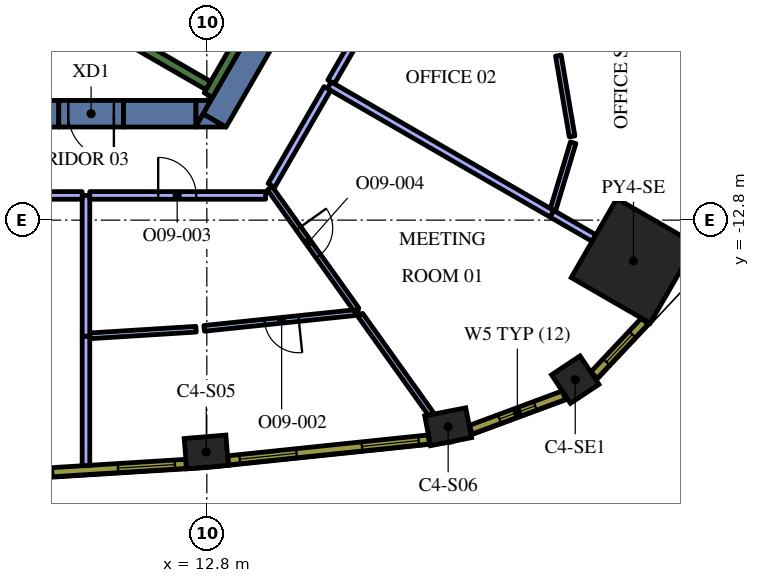
"""IFC4 building model, lengths in metres.
Left out: names, types, materials, properties, quantities, classifications, styles, units other than length and angle.
Written with IfcOpenShell. Run it as: python <this file> out.ifc"""

import sys

from ifc_helpers import new_model, si_unit, direction, frame, frame_2d, origin, origin_2d, place, context, subcontext, project, spatial, polyline, rectangle, outline, extrude, element, fill, save


model = new_model("IFC4")
c1 = context("Model", 3, precision=1e-05, world=origin(), true_north=direction((0.0, 1.0)))
c2 = subcontext(c1, "Body", "Model", "MODEL_VIEW")
j1 = project(units=[si_unit("LENGTHUNIT", "METRE"), si_unit("PLANEANGLEUNIT", "RADIAN")], contexts=[c1])
p1 = place(None, origin())
s1 = spatial("IfcSite", under=j1, at=p1, CompositionType="ELEMENT")
p2 = place(p1, origin())
s2 = spatial("IfcBuilding", under=s1, at=p2, CompositionType="ELEMENT")
p3 = place(p2, frame((0.0, 0.0, 243.6)))
s3 = spatial("IfcBuildingStorey", under=s2, at=p3, CompositionType="ELEMENT", Elevation=243.6)
p4 = place(p3, frame((24.027, -13.872, 0.0), z_axis=(0.0, 0.0, 1.0), x_axis=(0.866025403784, -0.5, 0.0)))
e1 = element("IfcColumn", 1, at=p4, inside=s3, PredefinedType="COLUMN", context=c2, shape_type="SweptSolid", body=[
    extrude(rectangle(XDim=2.4, YDim=2.4, at=origin_2d()), origin(), (0.0, 0.0, 1.0), 4.2),
])
for number, where, z_axis, x_axis in (
    (2, (12.785, -18.9, 0.0), (0.0, 0.0, 1.0), (0.997, 0.083, 0.0)),
    (3, (19.15, -18.237, 0.0), (0.0, 0.0, 1.0), (0.981, 0.192, 0.0)),
):
    element("IfcColumn", number, at=place(p3, frame(where, z_axis=z_axis, x_axis=x_axis)), inside=s3, PredefinedType="COLUMN", context=c2, shape_type="SweptSolid", body=[
        extrude(rectangle(XDim=1.1, YDim=0.8, at=origin_2d()), origin(), (0.0, 0.0, 1.0), 4.2),
    ])
p5 = place(p3, frame((22.494, -16.997, 0.0), z_axis=(0.0, 0.0, 1.0), x_axis=(0.833238868178, 0.552913183563, 0.0)))
e4 = element("IfcColumn", 4, at=p5, inside=s3, PredefinedType="COLUMN", context=c2, shape_type="SweptSolid", body=[
    extrude(rectangle(XDim=0.9, YDim=0.9, at=origin_2d()), origin(), (0.0, 0.0, 1.0), 4.2),
])
p6 = place(p3, frame((13.003, -10.179, 0.0), z_axis=(0.0, 0.0, 1.0), x_axis=(0.499972675833, 0.866041178825, 0.0)))
e5 = element("IfcWall", 5, at=p6, inside=s3, PredefinedType="SOLIDWALL", context=c2, shape_type="SweptSolid", body=[
    extrude(rectangle(XDim=3.829, YDim=0.7, at=frame_2d((1.915, 0.0))), origin(), (0.0, 0.0, 1.0), 4.2),
])
p7 = place(p3, origin())
e6 = element("IfcWall", 6, at=p7, inside=s3, PredefinedType="SOLIDWALL", context=c2, shape_type="SweptSolid", body=[
    extrude(outline(polyline([(12.5, -10.35), (12.698, -10.005), (13.296, -10.35), (12.5, -10.35)])), origin(), (0.0, 0.0, 1.0), 4.2),
])
p8 = place(p3, frame((10.604, -10.0, 0.0), z_axis=(0.0, 0.0, 1.0), x_axis=(1.0, 0.0, 0.0)))
e7 = element("IfcWall", 7, at=p8, inside=s3, PredefinedType="SOLIDWALL", context=c2, shape_type="SweptSolid", body=[
    extrude(rectangle(XDim=1.909, YDim=0.7, at=frame_2d((0.955, 0.0))), origin(), (0.0, 0.0, 1.0), 4.2),
])
e8 = element("IfcWall", 8, at=p7, inside=s3, PredefinedType="SOLIDWALL", context=c2, shape_type="SweptSolid", body=[
    extrude(outline(polyline([(12.904, -9.65), (12.516, -10.322), (12.516, -9.65), (12.904, -9.65)])), origin(), (0.0, 0.0, 1.0), 4.2),
])
p9 = place(p3, frame((8.904, -10.0, 0.0), z_axis=(0.0, 0.0, 1.0), x_axis=(-1.0, 0.0, 0.0)))
e9 = element("IfcWall", 9, at=p9, inside=s3, PredefinedType="SOLIDWALL", context=c2, shape_type="SweptSolid", body=[
    extrude(rectangle(XDim=22.226, YDim=0.7, at=frame_2d((11.113, 0.0))), origin(), (0.0, 0.0, 1.0), 4.2),
])
p10 = place(p3, frame((12.84, -9.511, 0.0), z_axis=(0.0, 0.0, 1.0), x_axis=(0.500048121057, 0.865997619297, 0.0)))
e10 = element("IfcWall", 10, at=p10, inside=s3, PredefinedType="SOLIDWALL", context=c2, shape_type="SweptSolid", body=[
    extrude(rectangle(XDim=3.634, YDim=0.25, at=frame_2d((1.817, 0.0))), origin(), (0.0, 0.0, 1.0), 4.2),
])
p11 = place(p3, frame((12.84, -9.261, 0.0), z_axis=(0.0, 0.0, 1.0), x_axis=(-0.866013990052, 0.500019768644, 0.0)))
e11 = element("IfcWall", 11, at=p11, inside=s3, PredefinedType="SOLIDWALL", context=c2, shape_type="SweptSolid", body=[
    extrude(rectangle(XDim=6.8, YDim=0.25, at=frame_2d((3.4, 0.0))), origin(), (0.0, 0.0, 1.0), 4.2),
])
p12 = place(p3, frame((10.604, -10.0, 0.0), z_axis=(0.0, 0.0, 1.0), x_axis=(-1.0, 0.0, 0.0)))
e12 = element("IfcWall", 12, at=p12, inside=s3, PredefinedType="SOLIDWALL", context=c2, shape_type="SweptSolid", body=[
    extrude(rectangle(XDim=1.7, YDim=0.7, at=frame_2d((0.85, 0.0))), origin(), (0.0, 0.0, 1.0), 4.2),
])
p13 = place(p12, frame((0.25, 0.0, 0.0)))
e13 = element("IfcOpeningElement", 13, at=p13, cuts=e12, PredefinedType="OPENING", context=c2, shape_type="SweptSolid", body=[
    extrude(rectangle(XDim=1.2, YDim=2.1, at=frame_2d((0.6, 1.05))), frame((0.0, 0.36, 0.0), z_axis=(0.0, -1.0, 0.0), x_axis=(1.0, 0.0, 0.0)), (0.0, 0.0, 1.0), 0.72),
])
p14 = place(p3, frame((9.62, -15.847, 0.0), z_axis=(0.0, 0.0, 1.0), x_axis=(0.0, -1.0, 0.0)))
e14 = element("IfcWall", 14, at=p14, inside=s3, PredefinedType="PARTITIONING", context=c2, shape_type="SweptSolid", body=[
    extrude(rectangle(XDim=3.411, YDim=0.2, at=frame_2d((1.705, 0.0))), origin(), (0.0, 0.0, 1.0), 3.45),
])
p15 = place(p3, frame((9.62, -12.15, 0.0), z_axis=(0.0, 0.0, 1.0), x_axis=(0.0, -1.0, 0.0)))
e15 = element("IfcWall", 15, at=p15, inside=s3, PredefinedType="PARTITIONING", context=c2, shape_type="SweptSolid", body=[
    extrude(rectangle(XDim=3.705, YDim=0.2, at=frame_2d((1.853, 0.0))), origin(), (0.0, 0.0, 1.0), 3.45),
])
p16 = place(p3, frame((7.03, -12.15, 0.0), z_axis=(0.0, 0.0, 1.0), x_axis=(1.0, 0.0, 0.0)))
e16 = element("IfcWall", 16, at=p16, inside=s3, PredefinedType="PARTITIONING", context=c2, shape_type="SweptSolid", body=[
    extrude(rectangle(XDim=2.49, YDim=0.2, at=frame_2d((1.245, 0.0))), origin(), (0.0, 0.0, 1.0), 3.45),
])
p17 = place(p3, frame((9.72, -15.844, 0.0), z_axis=(0.0, 0.0, 1.0), x_axis=(0.998063411199, 0.062204720286, 0.0)))
e17 = element("IfcWall", 17, at=p17, inside=s3, PredefinedType="PARTITIONING", context=c2, shape_type="SweptSolid", body=[
    extrude(rectangle(XDim=2.802, YDim=0.15, at=frame_2d((1.401, 0.0))), origin(), (0.0, 0.0, 1.0), 3.45),
])
p18 = place(p3, frame((16.788, -15.225, 0.0), z_axis=(0.0, 0.0, 1.0), x_axis=(-0.994622518406, -0.103566625322, 0.0)))
e18 = element("IfcWall", 18, at=p18, inside=s3, PredefinedType="PARTITIONING", context=c2, shape_type="SweptSolid", body=[
    extrude(rectangle(XDim=4.081, YDim=0.15, at=frame_2d((2.04, 0.0))), origin(), (0.0, 0.0, 1.0), 3.45),
])
p19 = place(p18, frame((1.581, 0.0, 0.0)))
e19 = element("IfcOpeningElement", 19, at=p19, cuts=e18, PredefinedType="OPENING", context=c2, shape_type="SweptSolid", body=[
    extrude(rectangle(XDim=0.9, YDim=2.1, at=frame_2d((0.45, 1.05))), frame((0.0, 0.085, 0.0), z_axis=(0.0, -1.0, 0.0), x_axis=(1.0, 0.0, 0.0)), (0.0, 0.0, 1.0), 0.17),
])
p20 = place(p3, frame((16.838, -15.295, 0.0), z_axis=(0.0, 0.0, 1.0), x_axis=(0.581015803238, -0.813892275666, 0.0)))
e20 = element("IfcWall", 20, at=p20, inside=s3, PredefinedType="PARTITIONING", context=c2, shape_type="SweptSolid", body=[
    extrude(rectangle(XDim=3.219, YDim=0.15, at=frame_2d((1.61, 0.0))), origin(), (0.0, 0.0, 1.0), 3.45),
])
p21 = place(p3, frame((14.457, -11.96, 0.0), z_axis=(0.0, 0.0, 1.0), x_axis=(0.581049944662, -0.81386790194, 0.0)))
e21 = element("IfcWall", 21, at=p21, inside=s3, PredefinedType="PARTITIONING", context=c2, shape_type="SweptSolid", body=[
    extrude(rectangle(XDim=3.926, YDim=0.15, at=frame_2d((1.963, 0.0))), origin(), (0.0, 0.0, 1.0), 3.45),
])
p22 = place(p21, frame((1.3, 0.0, 0.0)))
e22 = element("IfcOpeningElement", 22, at=p22, cuts=e21, PredefinedType="OPENING", context=c2, shape_type="SweptSolid", body=[
    extrude(rectangle(XDim=0.9, YDim=2.1, at=frame_2d((0.45, 1.05))), frame((0.0, 0.085, 0.0), z_axis=(0.0, -1.0, 0.0), x_axis=(1.0, 0.0, 0.0)), (0.0, 0.0, 1.0), 0.17),
])
p23 = place(p3, frame((9.72, -12.15, 0.0), z_axis=(0.0, 0.0, 1.0), x_axis=(1.0, 0.0, 0.0)))
e23 = element("IfcWall", 23, at=p23, inside=s3, PredefinedType="PARTITIONING", context=c2, shape_type="SweptSolid", body=[
    extrude(rectangle(XDim=4.627, YDim=0.2, at=frame_2d((2.314, 0.0))), origin(), (0.0, 0.0, 1.0), 3.45),
])
p24 = place(p23, frame((1.8, 0.0, 0.0)))
e24 = element("IfcOpeningElement", 24, at=p24, cuts=e23, PredefinedType="OPENING", context=c2, shape_type="SweptSolid", body=[
    extrude(rectangle(XDim=1.0, YDim=2.1, at=frame_2d((0.5, 1.05))), frame((0.0, 0.11, 0.0), z_axis=(0.0, -1.0, 0.0), x_axis=(1.0, 0.0, 0.0)), (0.0, 0.0, 1.0), 0.22),
])
p25 = place(p3, frame((21.873, -12.628, 0.0), z_axis=(0.0, 0.0, 1.0), x_axis=(0.866052988967, -0.499952218018, 0.0)))
e25 = element("IfcWall", 25, at=p25, inside=s3, PredefinedType="PARTITIONING", context=c2, shape_type="SweptSolid", body=[
    extrude(rectangle(XDim=1.288, YDim=0.2, at=frame_2d((0.644, 0.0))), origin(), (0.0, 0.0, 1.0), 3.45),
])
p26 = place(p3, frame((16.021, -9.25, 0.0), z_axis=(0.0, 0.0, 1.0), x_axis=(0.86602692059, -0.499997372806, 0.0)))
e26 = element("IfcWall", 26, at=p26, inside=s3, PredefinedType="PARTITIONING", context=c2, shape_type="SweptSolid", body=[
    extrude(rectangle(XDim=6.765, YDim=0.2, at=frame_2d((3.382, 0.0))), origin(), (0.0, 0.0, 1.0), 3.45),
])
p27 = place(p3, frame((14.498, -11.888, 0.0), z_axis=(0.0, 0.0, 1.0), x_axis=(0.500006981563, 0.86602137294, 0.0)))
e27 = element("IfcWall", 27, at=p27, inside=s3, PredefinedType="PARTITIONING", context=c2, shape_type="SweptSolid", body=[
    extrude(rectangle(XDim=2.946, YDim=0.2, at=frame_2d((1.473, 0.0))), origin(), (0.0, 0.0, 1.0), 3.45),
])
p28 = place(p3, frame((21.906, -12.532, 0.0), z_axis=(0.0, 0.0, 1.0), x_axis=(0.288789848591, 0.957392512688, 0.0)))
e28 = element("IfcWall", 28, at=p28, inside=s3, PredefinedType="PARTITIONING", context=c2, shape_type="SweptSolid", body=[
    extrude(rectangle(XDim=1.848, YDim=0.15, at=frame_2d((0.924, 0.0))), origin(), (0.0, 0.0, 1.0), 3.45),
])
p29 = place(p3, frame((22.412, -10.597, 0.0), z_axis=(0.0, 0.0, 1.0), x_axis=(-0.167612004459, 0.985853039738, 0.0)))
e29 = element("IfcWall", 29, at=p29, inside=s3, PredefinedType="PARTITIONING", context=c2, shape_type="SweptSolid", body=[
    extrude(rectangle(XDim=2.156, YDim=0.15, at=frame_2d((1.078, 0.0))), origin(), (0.0, 0.0, 1.0), 3.45),
])
p30 = place(p3, frame((16.072, -9.163, 0.0), z_axis=(0.0, 0.0, 1.0), x_axis=(0.500010870188, 0.866019127788, 0.0)))
e30 = element("IfcWall", 30, at=p30, inside=s3, PredefinedType="PARTITIONING", context=c2, shape_type="SweptSolid", body=[
    extrude(rectangle(XDim=3.249, YDim=0.2, at=frame_2d((1.624, 0.0))), origin(), (0.0, 0.0, 1.0), 3.45),
])
p31 = place(p3, frame((6.965, -19.543, 0.0), z_axis=(0.0, 0.0, 1.0), x_axis=(0.9980633213, 0.062206162685, 0.0)))
e31 = element("IfcWall", 31, at=p31, inside=s3, PredefinedType="SOLIDWALL", context=c2, shape_type="SweptSolid", body=[
    extrude(rectangle(XDim=5.298, YDim=0.24, at=frame_2d((2.649, 0.0))), origin(), (0.0, 0.0, 1.0), 3.95),
])
p32 = place(p31, frame((0.295, 0.0, 0.9)))
e32 = element("IfcOpeningElement", 32, at=p32, cuts=e31, PredefinedType="OPENING", context=c2, shape_type="SweptSolid", body=[
    extrude(rectangle(XDim=1.5, YDim=2.55, at=frame_2d((0.75, 1.275))), frame((0.0, 0.13, 0.0), z_axis=(0.0, -1.0, 0.0), x_axis=(1.0, 0.0, 0.0)), (0.0, 0.0, 1.0), 0.26),
])
p33 = place(p31, frame((3.504, 0.0, 0.9)))
e33 = element("IfcOpeningElement", 33, at=p33, cuts=e31, PredefinedType="OPENING", context=c2, shape_type="SweptSolid", body=[
    extrude(rectangle(XDim=1.5, YDim=2.55, at=frame_2d((0.75, 1.275))), frame((0.0, 0.13, 0.0), z_axis=(0.0, -1.0, 0.0), x_axis=(1.0, 0.0, 0.0)), (0.0, 0.0, 1.0), 0.26),
])
p34 = place(p3, frame((13.362, -19.121, 0.0), z_axis=(0.0, 0.0, 1.0), x_axis=(0.994621961215, 0.103571976272, 0.0)))
e34 = element("IfcWall", 34, at=p34, inside=s3, PredefinedType="SOLIDWALL", context=c2, shape_type="SweptSolid", body=[
    extrude(rectangle(XDim=5.311, YDim=0.24, at=frame_2d((2.655, 0.0))), origin(), (0.0, 0.0, 1.0), 3.95),
])
p35 = place(p34, frame((0.306, 0.0, 0.9)))
e35 = element("IfcOpeningElement", 35, at=p35, cuts=e34, PredefinedType="OPENING", context=c2, shape_type="SweptSolid", body=[
    extrude(rectangle(XDim=1.5, YDim=2.55, at=frame_2d((0.75, 1.275))), frame((0.0, 0.13, 0.0), z_axis=(0.0, -1.0, 0.0), x_axis=(1.0, 0.0, 0.0)), (0.0, 0.0, 1.0), 0.26),
])
p36 = place(p34, frame((3.539, 0.0, 0.9)))
e36 = element("IfcOpeningElement", 36, at=p36, cuts=e34, PredefinedType="OPENING", context=c2, shape_type="SweptSolid", body=[
    extrude(rectangle(XDim=1.5, YDim=2.55, at=frame_2d((0.75, 1.275))), frame((0.0, 0.13, 0.0), z_axis=(0.0, -1.0, 0.0), x_axis=(1.0, 0.0, 0.0)), (0.0, 0.0, 1.0), 0.26),
])
p37 = place(p3, frame((19.748, -18.314, 0.0), z_axis=(0.0, 0.0, 1.0), x_axis=(0.937569171184, 0.347798863203, 0.0)))
e37 = element("IfcWall", 37, at=p37, inside=s3, PredefinedType="SOLIDWALL", context=c2, shape_type="SweptSolid", body=[
    extrude(rectangle(XDim=2.609, YDim=0.24, at=frame_2d((1.305, 0.0))), origin(), (0.0, 0.0, 1.0), 3.95),
])
p38 = place(p37, frame((0.805, 0.0, 0.9)))
e38 = element("IfcOpeningElement", 38, at=p38, cuts=e37, PredefinedType="OPENING", context=c2, shape_type="SweptSolid", body=[
    extrude(rectangle(XDim=1.0, YDim=2.55, at=frame_2d((0.5, 1.275))), frame((0.0, 0.13, 0.0), z_axis=(0.0, -1.0, 0.0), x_axis=(1.0, 0.0, 0.0)), (0.0, 0.0, 1.0), 0.26),
])
p39 = place(p3, frame((22.989, -16.879, 0.0), z_axis=(0.0, 0.0, 1.0), x_axis=(0.684770274166, 0.728758994194, 0.0)))
e39 = element("IfcWall", 39, at=p39, inside=s3, PredefinedType="SOLIDWALL", context=c2, shape_type="SweptSolid", body=[
    extrude(rectangle(XDim=1.948, YDim=0.24, at=frame_2d((0.974, 0.0))), origin(), (0.0, 0.0, 1.0), 3.95),
])
p40 = place(p39, frame((0.474, 0.0, 0.9)))
e40 = element("IfcOpeningElement", 40, at=p40, cuts=e39, PredefinedType="OPENING", context=c2, shape_type="SweptSolid", body=[
    extrude(rectangle(XDim=1.0, YDim=2.55, at=frame_2d((0.5, 1.275))), frame((0.0, 0.13, 0.0), z_axis=(0.0, -1.0, 0.0), x_axis=(1.0, 0.0, 0.0)), (0.0, 0.0, 1.0), 0.26),
])
p41 = place(p13, origin())
e41 = element("IfcDoor", 41, at=p41, inside=s3, OperationType="SINGLE_SWING_LEFT", PredefinedType="DOOR", context=c2, shape_type="SweptSolid", body=[
    extrude(rectangle(XDim=1.2, YDim=2.1, at=frame_2d((0.6, 1.05))), frame((0.0, 0.025, 0.0), z_axis=(0.0, -1.0, 0.0), x_axis=(1.0, 0.0, 0.0)), (0.0, 0.0, 1.0), 0.05),
])
fill(e13, e41)
p42 = place(p19, origin())
e42 = element("IfcDoor", 42, at=p42, inside=s3, OperationType="SINGLE_SWING_LEFT", PredefinedType="DOOR", context=c2, shape_type="SweptSolid", body=[
    extrude(rectangle(XDim=0.9, YDim=2.1, at=frame_2d((0.45, 1.05))), frame((0.0, 0.025, 0.0), z_axis=(0.0, -1.0, 0.0), x_axis=(1.0, 0.0, 0.0)), (0.0, 0.0, 1.0), 0.05),
])
fill(e19, e42)
p43 = place(p24, origin())
e43 = element("IfcDoor", 43, at=p43, inside=s3, OperationType="SINGLE_SWING_LEFT", PredefinedType="DOOR", context=c2, shape_type="SweptSolid", body=[
    extrude(rectangle(XDim=1.0, YDim=2.1, at=frame_2d((0.5, 1.05))), frame((0.0, 0.025, 0.0), z_axis=(0.0, -1.0, 0.0), x_axis=(1.0, 0.0, 0.0)), (0.0, 0.0, 1.0), 0.05),
])
fill(e24, e43)
p44 = place(p22, origin())
e44 = element("IfcDoor", 44, at=p44, inside=s3, OperationType="SINGLE_SWING_LEFT", PredefinedType="DOOR", context=c2, shape_type="SweptSolid", body=[
    extrude(rectangle(XDim=0.9, YDim=2.1, at=frame_2d((0.45, 1.05))), frame((0.0, 0.025, 0.0), z_axis=(0.0, -1.0, 0.0), x_axis=(1.0, 0.0, 0.0)), (0.0, 0.0, 1.0), 0.05),
])
fill(e22, e44)
p45 = place(p32, origin())
e45 = element("IfcWindow", 45, at=p45, inside=s3, PartitioningType="SINGLE_PANEL", PredefinedType="WINDOW", context=c2, shape_type="SweptSolid", body=[
    extrude(rectangle(XDim=1.5, YDim=2.55, at=frame_2d((0.75, 1.275))), frame((0.0, 0.04, 0.0), z_axis=(0.0, -1.0, 0.0), x_axis=(1.0, 0.0, 0.0)), (0.0, 0.0, 1.0), 0.06),
])
fill(e32, e45)
p46 = place(p33, origin())
e46 = element("IfcWindow", 46, at=p46, inside=s3, PartitioningType="SINGLE_PANEL", PredefinedType="WINDOW", context=c2, shape_type="SweptSolid", body=[
    extrude(rectangle(XDim=1.5, YDim=2.55, at=frame_2d((0.75, 1.275))), frame((0.0, 0.04, 0.0), z_axis=(0.0, -1.0, 0.0), x_axis=(1.0, 0.0, 0.0)), (0.0, 0.0, 1.0), 0.06),
])
fill(e33, e46)
p47 = place(p35, origin())
e47 = element("IfcWindow", 47, at=p47, inside=s3, PartitioningType="SINGLE_PANEL", PredefinedType="WINDOW", context=c2, shape_type="SweptSolid", body=[
    extrude(rectangle(XDim=1.5, YDim=2.55, at=frame_2d((0.75, 1.275))), frame((0.0, 0.04, 0.0), z_axis=(0.0, -1.0, 0.0), x_axis=(1.0, 0.0, 0.0)), (0.0, 0.0, 1.0), 0.06),
])
fill(e35, e47)
p48 = place(p36, origin())
e48 = element("IfcWindow", 48, at=p48, inside=s3, PartitioningType="SINGLE_PANEL", PredefinedType="WINDOW", context=c2, shape_type="SweptSolid", body=[
    extrude(rectangle(XDim=1.5, YDim=2.55, at=frame_2d((0.75, 1.275))), frame((0.0, 0.04, 0.0), z_axis=(0.0, -1.0, 0.0), x_axis=(1.0, 0.0, 0.0)), (0.0, 0.0, 1.0), 0.06),
])
fill(e36, e48)
p49 = place(p38, origin())
e49 = element("IfcWindow", 49, at=p49, inside=s3, PartitioningType="SINGLE_PANEL", PredefinedType="WINDOW", context=c2, shape_type="SweptSolid", body=[
    extrude(rectangle(XDim=1.0, YDim=2.55, at=frame_2d((0.5, 1.275))), frame((0.0, 0.04, 0.0), z_axis=(0.0, -1.0, 0.0), x_axis=(1.0, 0.0, 0.0)), (0.0, 0.0, 1.0), 0.06),
])
fill(e38, e49)
p50 = place(p40, origin())
e50 = element("IfcWindow", 50, at=p50, inside=s3, PartitioningType="SINGLE_PANEL", PredefinedType="WINDOW", context=c2, shape_type="SweptSolid", body=[
    extrude(rectangle(XDim=1.0, YDim=2.55, at=frame_2d((0.5, 1.275))), frame((0.0, 0.04, 0.0), z_axis=(0.0, -1.0, 0.0), x_axis=(1.0, 0.0, 0.0)), (0.0, 0.0, 1.0), 0.06),
])
fill(e40, e50)
save(model, sys.argv[1])
